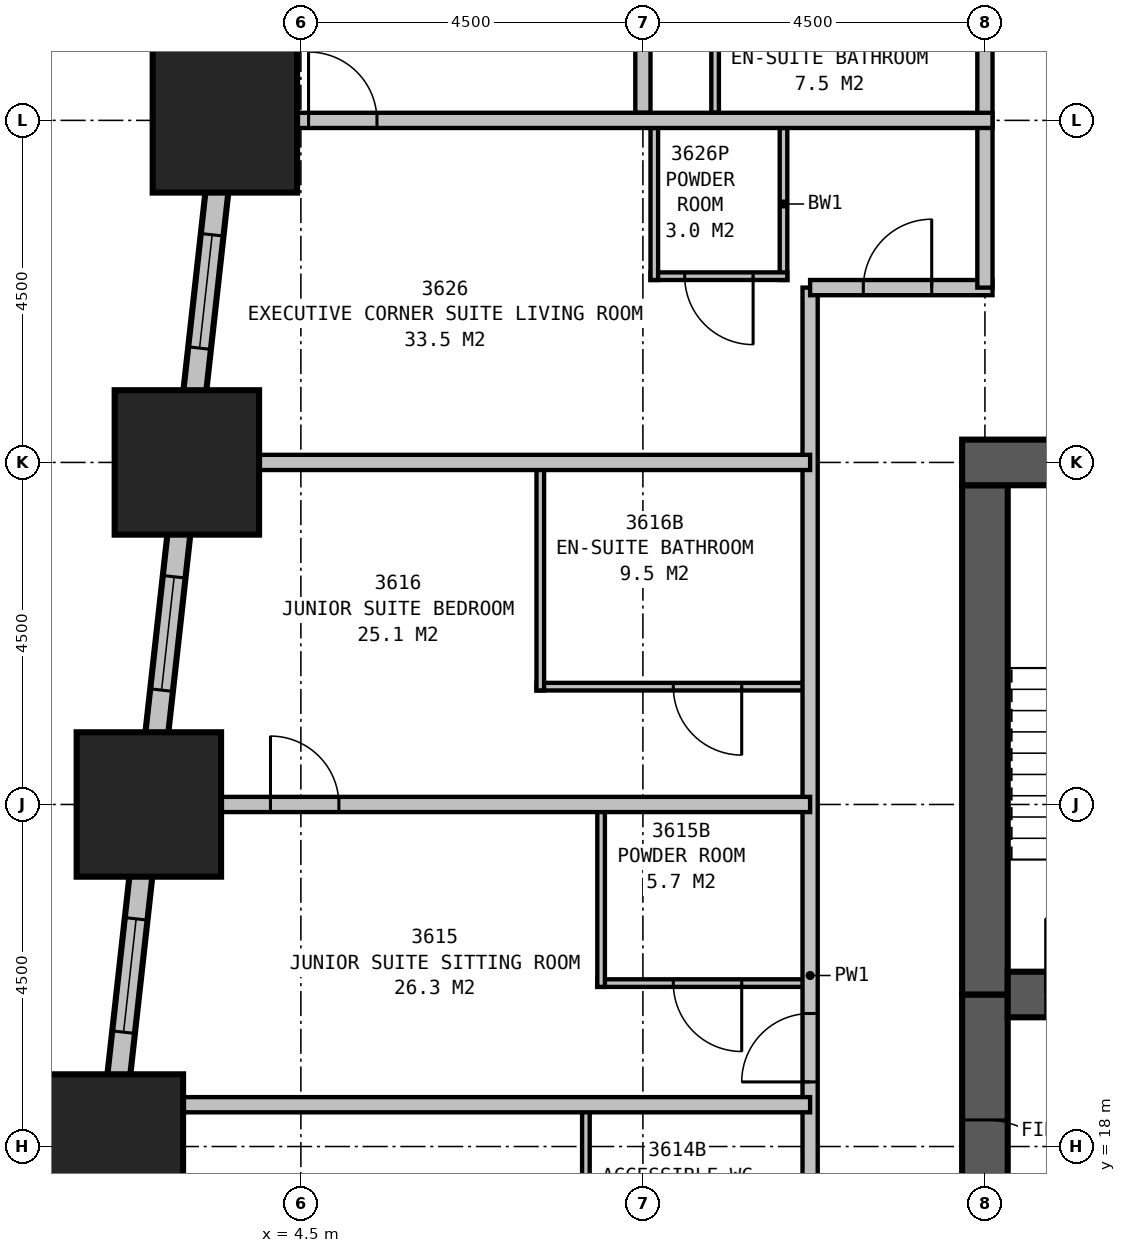
"""IFC4 building model, lengths in metres.
Left out: names, types, materials, properties, quantities, classifications, styles, units other than length and angle.
Written with IfcOpenShell. Run it as: python <this file> out.ifc"""

import sys

from ifc_helpers import new_model, si_unit, direction, frame, frame_2d, origin, origin_2d, place, context, subcontext, project, spatial, rectangle, extrude, element, fill, save


model = new_model("IFC4")
c1 = context("Model", 3, precision=1e-05, world=origin(), true_north=direction((0.0, 1.0)))
c2 = subcontext(c1, "Body", "Model", "MODEL_VIEW")
j1 = project(units=[si_unit("LENGTHUNIT", "METRE"), si_unit("PLANEANGLEUNIT", "RADIAN")], contexts=[c1])
p1 = place(None, origin())
s1 = spatial("IfcSite", under=j1, at=p1, CompositionType="ELEMENT")
p2 = place(p1, origin())
s2 = spatial("IfcBuilding", under=s1, at=p2, CompositionType="ELEMENT")
p3 = place(p2, frame((0.0, 0.0, 138.9)))
s3 = spatial("IfcBuildingStorey", under=s2, at=p3, CompositionType="ELEMENT", Elevation=138.9)
for number, where, z_axis, x_axis in (
    (1, (3.5, 31.5, 0.0), (0.0, 0.0, 1.0), (1.0, 0.0, 0.0)),
    (2, (3.0, 27.0, 0.0), (0.0, 0.0, 1.0), (1.0, 0.0, 0.0)),
    (3, (2.5, 22.5, 0.0), (0.0, 0.0, 1.0), (1.0, 0.0, 0.0)),
    (4, (2.0, 18.0, 0.0), (0.0, 0.0, 1.0), (1.0, 0.0, 0.0)),
):
    element("IfcColumn", number, at=place(p3, frame(where, z_axis=z_axis, x_axis=x_axis)), inside=s3, PredefinedType="COLUMN", context=c2, shape_type="SweptSolid", body=[
        extrude(rectangle(XDim=1.9, YDim=1.9, at=origin_2d()), origin(), (0.0, 0.0, 1.0), 3.5),
    ])
p4 = place(p3, frame((36.3, 27.0, 0.0), z_axis=(0.0, 0.0, 1.0), x_axis=(-1.0, 0.0, 0.0)))
e5 = element("IfcWall", 5, at=p4, inside=s3, PredefinedType="SHEAR", context=c2, shape_type="SweptSolid", body=[
    extrude(rectangle(XDim=23.1, YDim=0.6, at=frame_2d((11.55, 0.0))), origin(), (0.0, 0.0, 1.0), 3.5),
])
p5 = place(p4, frame((17.05, 0.0, 0.0)))
e6 = element("IfcOpeningElement", 6, at=p5, cuts=e5, PredefinedType="OPENING", context=c2, shape_type="SweptSolid", body=[
    extrude(rectangle(XDim=1.0, YDim=2.1, at=frame_2d((0.5, 1.05))), frame((0.0, 0.31, 0.0), z_axis=(0.0, -1.0, 0.0), x_axis=(1.0, 0.0, 0.0)), (0.0, 0.0, 1.0), 0.62),
])
p6 = place(p4, frame((12.05, 0.0, 0.0)))
e7 = element("IfcOpeningElement", 7, at=p6, cuts=e5, PredefinedType="OPENING", context=c2, shape_type="SweptSolid", body=[
    extrude(rectangle(XDim=1.0, YDim=2.1, at=frame_2d((0.5, 1.05))), frame((0.0, 0.31, 0.0), z_axis=(0.0, -1.0, 0.0), x_axis=(1.0, 0.0, 0.0)), (0.0, 0.0, 1.0), 0.62),
])
p7 = place(p4, frame((7.05, 0.0, 0.0)))
e8 = element("IfcOpeningElement", 8, at=p7, cuts=e5, PredefinedType="OPENING", context=c2, shape_type="SweptSolid", body=[
    extrude(rectangle(XDim=1.0, YDim=2.1, at=frame_2d((0.5, 1.05))), frame((0.0, 0.31, 0.0), z_axis=(0.0, -1.0, 0.0), x_axis=(1.0, 0.0, 0.0)), (0.0, 0.0, 1.0), 0.62),
])
p8 = place(p3, frame((13.8, 20.0, 0.0), z_axis=(0.0, 0.0, 1.0), x_axis=(1.0, 0.0, 0.0)))
e9 = element("IfcWall", 9, at=p8, inside=s3, PredefinedType="SHEAR", context=c2, shape_type="SweptSolid", body=[
    extrude(rectangle(XDim=21.9, YDim=0.6, at=frame_2d((10.95, 0.0))), origin(), (0.0, 0.0, 1.0), 3.5),
])
p9 = place(p8, frame((0.5, 0.0, 0.0)))
e10 = element("IfcOpeningElement", 10, at=p9, cuts=e9, PredefinedType="OPENING", context=c2, shape_type="SweptSolid", body=[
    extrude(rectangle(XDim=1.0, YDim=2.1, at=frame_2d((0.5, 1.05))), frame((0.0, 0.31, 0.0), z_axis=(0.0, -1.0, 0.0), x_axis=(1.0, 0.0, 0.0)), (0.0, 0.0, 1.0), 0.62),
])
p10 = place(p8, frame((20.5, 0.0, 0.0)))
e11 = element("IfcOpeningElement", 11, at=p10, cuts=e9, PredefinedType="OPENING", context=c2, shape_type="SweptSolid", body=[
    extrude(rectangle(XDim=1.0, YDim=2.1, at=frame_2d((0.5, 1.05))), frame((0.0, 0.31, 0.0), z_axis=(0.0, -1.0, 0.0), x_axis=(1.0, 0.0, 0.0)), (0.0, 0.0, 1.0), 0.62),
])
p11 = place(p8, frame((16.65, 0.0, 0.0)))
e12 = element("IfcOpeningElement", 12, at=p11, cuts=e9, PredefinedType="OPENING", context=c2, shape_type="SweptSolid", body=[
    extrude(rectangle(XDim=1.1, YDim=2.1, at=frame_2d((0.55, 1.05))), frame((0.0, 0.31, 0.0), z_axis=(0.0, -1.0, 0.0), x_axis=(1.0, 0.0, 0.0)), (0.0, 0.0, 1.0), 0.62),
])
p12 = place(p3, frame((13.5, 26.7, 0.0), z_axis=(0.0, 0.0, 1.0), x_axis=(0.0, -1.0, 0.0)))
e13 = element("IfcWall", 13, at=p12, inside=s3, PredefinedType="SHEAR", context=c2, shape_type="SweptSolid", body=[
    extrude(rectangle(XDim=6.7, YDim=0.6, at=frame_2d((3.35, 0.0))), origin(), (0.0, 0.0, 1.0), 3.5),
])
p13 = place(p3, frame((13.5, 20.0, 0.0), z_axis=(0.0, 0.0, 1.0), x_axis=(0.0, -1.0, 0.0)))
e14 = element("IfcWall", 14, at=p13, inside=s3, PredefinedType="SHEAR", context=c2, shape_type="SweptSolid", body=[
    extrude(rectangle(XDim=3.5, YDim=0.6, at=frame_2d((1.75, 0.0))), origin(), (0.0, 0.0, 1.0), 3.5),
])
p14 = place(p13, frame((1.65, 0.0, 0.0)))
e15 = element("IfcOpeningElement", 15, at=p14, cuts=e14, PredefinedType="OPENING", context=c2, shape_type="SweptSolid", body=[
    extrude(rectangle(XDim=1.2, YDim=2.1, at=frame_2d((0.6, 1.05))), frame((0.0, 0.31, 0.0), z_axis=(0.0, -1.0, 0.0), x_axis=(1.0, 0.0, 0.0)), (0.0, 0.0, 1.0), 0.62),
])
p15 = place(p3, frame((4.017, 36.149, 0.0), z_axis=(0.0, 0.0, 1.0), x_axis=(-0.110433201132, -0.993883548555, 0.0)))
e16 = element("IfcWall", 16, at=p15, inside=s3, PredefinedType="STANDARD", context=c2, shape_type="SweptSolid", body=[
    extrude(rectangle(XDim=31.994, YDim=0.3, at=frame_2d((15.997, 0.0))), origin(), (0.0, 0.0, 1.0), 2.15),
])
p16 = place(p15, frame((1.664, 0.0, 0.5)))
e17 = element("IfcOpeningElement", 17, at=p16, cuts=e16, PredefinedType="OPENING", context=c2, shape_type="SweptSolid", body=[
    extrude(rectangle(XDim=1.5, YDim=1.5, at=frame_2d((0.75, 0.75))), frame((0.0, 0.16, 0.0), z_axis=(0.0, -1.0, 0.0), x_axis=(1.0, 0.0, 0.0)), (0.0, 0.0, 1.0), 0.32),
])
p17 = place(p15, frame((6.192, 0.0, 0.5)))
e18 = element("IfcOpeningElement", 18, at=p17, cuts=e16, PredefinedType="OPENING", context=c2, shape_type="SweptSolid", body=[
    extrude(rectangle(XDim=1.5, YDim=1.5, at=frame_2d((0.75, 0.75))), frame((0.0, 0.16, 0.0), z_axis=(0.0, -1.0, 0.0), x_axis=(1.0, 0.0, 0.0)), (0.0, 0.0, 1.0), 0.32),
])
p18 = place(p15, frame((10.719, 0.0, 0.5)))
e19 = element("IfcOpeningElement", 19, at=p18, cuts=e16, PredefinedType="OPENING", context=c2, shape_type="SweptSolid", body=[
    extrude(rectangle(XDim=1.5, YDim=1.5, at=frame_2d((0.75, 0.75))), frame((0.0, 0.16, 0.0), z_axis=(0.0, -1.0, 0.0), x_axis=(1.0, 0.0, 0.0)), (0.0, 0.0, 1.0), 0.32),
])
p19 = place(p15, frame((15.247, 0.0, 0.5)))
e20 = element("IfcOpeningElement", 20, at=p19, cuts=e16, PredefinedType="OPENING", context=c2, shape_type="SweptSolid", body=[
    extrude(rectangle(XDim=1.5, YDim=1.5, at=frame_2d((0.75, 0.75))), frame((0.0, 0.16, 0.0), z_axis=(0.0, -1.0, 0.0), x_axis=(1.0, 0.0, 0.0)), (0.0, 0.0, 1.0), 0.32),
])
p20 = place(p15, frame((19.775, 0.0, 0.5)))
e21 = element("IfcOpeningElement", 21, at=p20, cuts=e16, PredefinedType="OPENING", context=c2, shape_type="SweptSolid", body=[
    extrude(rectangle(XDim=1.5, YDim=1.5, at=frame_2d((0.75, 0.75))), frame((0.0, 0.16, 0.0), z_axis=(0.0, -1.0, 0.0), x_axis=(1.0, 0.0, 0.0)), (0.0, 0.0, 1.0), 0.32),
])
p21 = place(p15, frame((24.302, 0.0, 0.5)))
e22 = element("IfcOpeningElement", 22, at=p21, cuts=e16, PredefinedType="OPENING", context=c2, shape_type="SweptSolid", body=[
    extrude(rectangle(XDim=1.5, YDim=1.5, at=frame_2d((0.75, 0.75))), frame((0.0, 0.16, 0.0), z_axis=(0.0, -1.0, 0.0), x_axis=(1.0, 0.0, 0.0)), (0.0, 0.0, 1.0), 0.32),
])
p22 = place(p15, frame((28.83, 0.0, 0.5)))
e23 = element("IfcOpeningElement", 23, at=p22, cuts=e16, PredefinedType="OPENING", context=c2, shape_type="SweptSolid", body=[
    extrude(rectangle(XDim=1.5, YDim=1.5, at=frame_2d((0.75, 0.75))), frame((0.0, 0.16, 0.0), z_axis=(0.0, -1.0, 0.0), x_axis=(1.0, 0.0, 0.0)), (0.0, 0.0, 1.0), 0.32),
])
p23 = place(p3, frame((11.2, 29.3, 0.0), z_axis=(0.0, 0.0, 1.0), x_axis=(1.0, 0.0, 0.0)))
e24 = element("IfcWall", 24, at=p23, inside=s3, PredefinedType="PARTITIONING", context=c2, shape_type="SweptSolid", body=[
    extrude(rectangle(XDim=2.4, YDim=0.2, at=frame_2d((1.2, 0.0))), origin(), (0.0, 0.0, 1.0), 3.25),
])
p24 = place(p23, frame((0.7, 0.0, 0.0)))
e25 = element("IfcOpeningElement", 25, at=p24, cuts=e24, PredefinedType="OPENING", context=c2, shape_type="SweptSolid", body=[
    extrude(rectangle(XDim=0.9, YDim=2.1, at=frame_2d((0.45, 1.05))), frame((0.0, 0.11, 0.0), z_axis=(0.0, -1.0, 0.0), x_axis=(1.0, 0.0, 0.0)), (0.0, 0.0, 1.0), 0.22),
])
p25 = place(p3, frame((11.2, 11.2, 0.0), z_axis=(0.0, 0.0, 1.0), x_axis=(0.0, 1.0, 0.0)))
e26 = element("IfcWall", 26, at=p25, inside=s3, PredefinedType="PARTITIONING", context=c2, shape_type="SweptSolid", body=[
    extrude(rectangle(XDim=18.1, YDim=0.2, at=frame_2d((9.05, 0.0))), origin(), (0.0, 0.0, 1.0), 3.25),
])
p26 = place(p25, frame((3.2, 0.0, 0.0)))
e27 = element("IfcOpeningElement", 27, at=p26, cuts=e26, PredefinedType="OPENING", context=c2, shape_type="SweptSolid", body=[
    extrude(rectangle(XDim=1.0, YDim=2.1, at=frame_2d((0.5, 1.05))), frame((0.0, 0.11, 0.0), z_axis=(0.0, -1.0, 0.0), x_axis=(1.0, 0.0, 0.0)), (0.0, 0.0, 1.0), 0.22),
])
p27 = place(p25, frame((7.65, 0.0, 0.0)))
e28 = element("IfcOpeningElement", 28, at=p27, cuts=e26, PredefinedType="OPENING", context=c2, shape_type="SweptSolid", body=[
    extrude(rectangle(XDim=0.9, YDim=2.1, at=frame_2d((0.45, 1.05))), frame((0.0, 0.11, 0.0), z_axis=(0.0, -1.0, 0.0), x_axis=(1.0, 0.0, 0.0)), (0.0, 0.0, 1.0), 0.22),
])
p28 = place(p3, frame((11.2, 18.55, 0.0), z_axis=(0.0, 0.0, 1.0), x_axis=(-1.0, 0.0, 0.0)))
e29 = element("IfcWall", 29, at=p28, inside=s3, PredefinedType="PARTITIONING", context=c2, shape_type="SweptSolid", body=[
    extrude(rectangle(XDim=9.138, YDim=0.2, at=frame_2d((4.569, 0.0))), origin(), (0.0, 0.0, 1.0), 3.25),
])
p29 = place(p3, frame((11.2, 22.5, 0.0), z_axis=(0.0, 0.0, 1.0), x_axis=(-1.0, 0.0, 0.0)))
e30 = element("IfcWall", 30, at=p29, inside=s3, PredefinedType="PARTITIONING", context=c2, shape_type="SweptSolid", body=[
    extrude(rectangle(XDim=8.699, YDim=0.2, at=frame_2d((4.35, 0.0))), origin(), (0.0, 0.0, 1.0), 2.25),
])
p30 = place(p29, frame((7.1, 0.0, 0.0), z_axis=(0.0, 0.0, 1.0), x_axis=(-1.0, 0.0, 0.0)))
e31 = element("IfcOpeningElement", 31, at=p30, cuts=e30, PredefinedType="OPENING", context=c2, shape_type="SweptSolid", body=[
    extrude(rectangle(XDim=0.9, YDim=2.1, at=frame_2d((0.45, 1.05))), frame((0.0, 0.11, 0.0), z_axis=(0.0, -1.0, 0.0), x_axis=(1.0, 0.0, 0.0)), (0.0, 0.0, 1.0), 0.22),
])
p31 = place(p3, frame((8.25, 15.75, 0.0), z_axis=(0.0, 0.0, 1.0), x_axis=(0.0, 1.0, 0.0)))
e32 = element("IfcWall", 32, at=p31, inside=s3, PredefinedType="PLUMBINGWALL", context=c2, shape_type="SweptSolid", body=[
    extrude(rectangle(XDim=2.8, YDim=0.1, at=frame_2d((1.4, 0.0))), origin(), (0.0, 0.0, 1.0), 3.25),
])
p32 = place(p3, frame((8.45, 20.1, 0.0), z_axis=(0.0, 0.0, 1.0), x_axis=(0.0, 1.0, 0.0)))
e33 = element("IfcWall", 33, at=p32, inside=s3, PredefinedType="PLUMBINGWALL", context=c2, shape_type="SweptSolid", body=[
    extrude(rectangle(XDim=2.4, YDim=0.1, at=frame_2d((1.2, 0.0))), origin(), (0.0, 0.0, 1.0), 3.25),
])
p33 = place(p3, frame((11.2, 20.15, 0.0), z_axis=(0.0, 0.0, 1.0), x_axis=(-1.0, 0.0, 0.0)))
e34 = element("IfcWall", 34, at=p33, inside=s3, PredefinedType="PLUMBINGWALL", context=c2, shape_type="SweptSolid", body=[
    extrude(rectangle(XDim=2.8, YDim=0.1, at=frame_2d((1.4, 0.0))), origin(), (0.0, 0.0, 1.0), 3.25),
])
p34 = place(p33, frame((0.9, 0.0, 0.0)))
e35 = element("IfcOpeningElement", 35, at=p34, cuts=e34, PredefinedType="OPENING", context=c2, shape_type="SweptSolid", body=[
    extrude(rectangle(XDim=0.9, YDim=2.1, at=frame_2d((0.45, 1.05))), frame((0.0, 0.06, 0.0), z_axis=(0.0, -1.0, 0.0), x_axis=(1.0, 0.0, 0.0)), (0.0, 0.0, 1.0), 0.12),
])
p35 = place(p3, frame((7.65, 24.0, 0.0), z_axis=(0.0, 0.0, 1.0), x_axis=(0.0, 1.0, 0.0)))
e36 = element("IfcWall", 36, at=p35, inside=s3, PredefinedType="PLUMBINGWALL", context=c2, shape_type="SweptSolid", body=[
    extrude(rectangle(XDim=3.0, YDim=0.1, at=frame_2d((1.5, 0.0))), origin(), (0.0, 0.0, 1.0), 3.25),
])
p36 = place(p3, frame((11.2, 24.05, 0.0), z_axis=(0.0, 0.0, 1.0), x_axis=(-1.0, 0.0, 0.0)))
e37 = element("IfcWall", 37, at=p36, inside=s3, PredefinedType="PLUMBINGWALL", context=c2, shape_type="SweptSolid", body=[
    extrude(rectangle(XDim=3.6, YDim=0.1, at=frame_2d((1.8, 0.0))), origin(), (0.0, 0.0, 1.0), 3.25),
])
p37 = place(p36, frame((0.9, 0.0, 0.0)))
e38 = element("IfcOpeningElement", 38, at=p37, cuts=e37, PredefinedType="OPENING", context=c2, shape_type="SweptSolid", body=[
    extrude(rectangle(XDim=0.9, YDim=2.1, at=frame_2d((0.45, 1.05))), frame((0.0, 0.06, 0.0), z_axis=(0.0, -1.0, 0.0), x_axis=(1.0, 0.0, 0.0)), (0.0, 0.0, 1.0), 0.12),
])
p38 = place(p3, frame((11.2, 27.0, 0.0), z_axis=(0.0, 0.0, 1.0), x_axis=(-1.0, 0.0, 0.0)))
e39 = element("IfcWall", 39, at=p38, inside=s3, PredefinedType="PARTITIONING", context=c2, shape_type="SweptSolid", body=[
    extrude(rectangle(XDim=7.977, YDim=0.2, at=frame_2d((3.988, 0.0))), origin(), (0.0, 0.0, 1.0), 1.95),
])
p39 = place(p3, frame((13.5, 29.3, 0.0), z_axis=(0.0, 0.0, 1.0), x_axis=(0.0, 1.0, 0.0)))
e40 = element("IfcWall", 40, at=p39, inside=s3, PredefinedType="PARTITIONING", context=c2, shape_type="SweptSolid", body=[
    extrude(rectangle(XDim=11.2, YDim=0.2, at=frame_2d((5.6, 0.0))), origin(), (0.0, 0.0, 1.0), 2.25),
])
p40 = place(p3, frame((13.6, 31.5, 0.0), z_axis=(0.0, 0.0, 1.0), x_axis=(-1.0, 0.0, 0.0)))
e41 = element("IfcWall", 41, at=p40, inside=s3, PredefinedType="PARTITIONING", context=c2, shape_type="SweptSolid", body=[
    extrude(rectangle(XDim=10.099, YDim=0.2, at=frame_2d((5.05, 0.0))), origin(), (0.0, 0.0, 1.0), 3.25),
])
p41 = place(p40, frame((8.999, 0.0, 0.0), z_axis=(0.0, 0.0, 1.0), x_axis=(-1.0, 0.0, 0.0)))
e42 = element("IfcOpeningElement", 42, at=p41, cuts=e41, PredefinedType="OPENING", context=c2, shape_type="SweptSolid", body=[
    extrude(rectangle(XDim=0.9, YDim=2.1, at=frame_2d((0.45, 1.05))), frame((0.0, 0.11, 0.0), z_axis=(0.0, -1.0, 0.0), x_axis=(1.0, 0.0, 0.0)), (0.0, 0.0, 1.0), 0.22),
])
p42 = place(p3, frame((9.15, 31.4, 0.0), z_axis=(0.0, 0.0, 1.0), x_axis=(0.0, -1.0, 0.0)))
e43 = element("IfcWall", 43, at=p42, inside=s3, PredefinedType="PLUMBINGWALL", context=c2, shape_type="SweptSolid", body=[
    extrude(rectangle(XDim=2.0, YDim=0.1, at=frame_2d((1.0, 0.0))), origin(), (0.0, 0.0, 1.0), 2.25),
])
p43 = place(p3, frame((10.85, 31.4, 0.0), z_axis=(0.0, 0.0, 1.0), x_axis=(0.0, -1.0, 0.0)))
e44 = element("IfcWall", 44, at=p43, inside=s3, PredefinedType="PLUMBINGWALL", context=c2, shape_type="SweptSolid", body=[
    extrude(rectangle(XDim=2.0, YDim=0.1, at=frame_2d((1.0, 0.0))), origin(), (0.0, 0.0, 1.0), 3.25),
])
p44 = place(p3, frame((10.9, 29.45, 0.0), z_axis=(0.0, 0.0, 1.0), x_axis=(-1.0, 0.0, 0.0)))
e45 = element("IfcWall", 45, at=p44, inside=s3, PredefinedType="PLUMBINGWALL", context=c2, shape_type="SweptSolid", body=[
    extrude(rectangle(XDim=1.8, YDim=0.1, at=frame_2d((0.9, 0.0))), origin(), (0.0, 0.0, 1.0), 3.25),
])
p45 = place(p44, frame((0.45, 0.0, 0.0)))
e46 = element("IfcOpeningElement", 46, at=p45, cuts=e45, PredefinedType="OPENING", context=c2, shape_type="SweptSolid", body=[
    extrude(rectangle(XDim=0.9, YDim=2.1, at=frame_2d((0.45, 1.05))), frame((0.0, 0.06, 0.0), z_axis=(0.0, -1.0, 0.0), x_axis=(1.0, 0.0, 0.0)), (0.0, 0.0, 1.0), 0.12),
])
p46 = place(p3, frame((9.0, 31.6, 0.0), z_axis=(0.0, 0.0, 1.0), x_axis=(0.0, 1.0, 0.0)))
e47 = element("IfcWall", 47, at=p46, inside=s3, PredefinedType="PARTITIONING", context=c2, shape_type="SweptSolid", body=[
    extrude(rectangle(XDim=4.4, YDim=0.2, at=frame_2d((2.2, 0.0))), origin(), (0.0, 0.0, 1.0), 2.25),
])
p47 = place(p46, frame((3.3, 0.0, 0.0), z_axis=(0.0, 0.0, 1.0), x_axis=(-1.0, 0.0, 0.0)))
e48 = element("IfcOpeningElement", 48, at=p47, cuts=e47, PredefinedType="OPENING", context=c2, shape_type="SweptSolid", body=[
    extrude(rectangle(XDim=0.9, YDim=2.1, at=frame_2d((0.45, 1.05))), frame((0.0, 0.11, 0.0), z_axis=(0.0, -1.0, 0.0), x_axis=(1.0, 0.0, 0.0)), (0.0, 0.0, 1.0), 0.22),
])
p48 = place(p3, frame((9.95, 31.6, 0.0), z_axis=(0.0, 0.0, 1.0), x_axis=(0.0, 1.0, 0.0)))
e49 = element("IfcWall", 49, at=p48, inside=s3, PredefinedType="PLUMBINGWALL", context=c2, shape_type="SweptSolid", body=[
    extrude(rectangle(XDim=2.3, YDim=0.1, at=frame_2d((1.15, 0.0))), origin(), (0.0, 0.0, 1.0), 3.25),
])
p49 = place(p17, origin())
e50 = element("IfcWindow", 50, at=p49, inside=s3, PartitioningType="SINGLE_PANEL", PredefinedType="WINDOW", context=c2, shape_type="SweptSolid", body=[
    extrude(rectangle(XDim=1.5, YDim=1.5, at=frame_2d((0.75, 0.75))), frame((0.0, 0.03, 0.0), z_axis=(0.0, -1.0, 0.0), x_axis=(1.0, 0.0, 0.0)), (0.0, 0.0, 1.0), 0.06),
])
fill(e18, e50)
p50 = place(p18, origin())
e51 = element("IfcWindow", 51, at=p50, inside=s3, PartitioningType="SINGLE_PANEL", PredefinedType="WINDOW", context=c2, shape_type="SweptSolid", body=[
    extrude(rectangle(XDim=1.5, YDim=1.5, at=frame_2d((0.75, 0.75))), frame((0.0, 0.03, 0.0), z_axis=(0.0, -1.0, 0.0), x_axis=(1.0, 0.0, 0.0)), (0.0, 0.0, 1.0), 0.06),
])
fill(e19, e51)
p51 = place(p19, origin())
e52 = element("IfcWindow", 52, at=p51, inside=s3, PartitioningType="SINGLE_PANEL", PredefinedType="WINDOW", context=c2, shape_type="SweptSolid", body=[
    extrude(rectangle(XDim=1.5, YDim=1.5, at=frame_2d((0.75, 0.75))), frame((0.0, 0.03, 0.0), z_axis=(0.0, -1.0, 0.0), x_axis=(1.0, 0.0, 0.0)), (0.0, 0.0, 1.0), 0.06),
])
fill(e20, e52)
p52 = place(p24, origin())
e53 = element("IfcDoor", 53, at=p52, inside=s3, OperationType="SINGLE_SWING_RIGHT", PredefinedType="DOOR", context=c2, shape_type="SweptSolid", body=[
    extrude(rectangle(XDim=0.9, YDim=2.1, at=frame_2d((0.45, 1.05))), frame((0.0, 0.025, 0.0), z_axis=(0.0, -1.0, 0.0), x_axis=(1.0, 0.0, 0.0)), (0.0, 0.0, 1.0), 0.05),
])
fill(e25, e53)
p53 = place(p27, origin())
e54 = element("IfcDoor", 54, at=p53, inside=s3, OperationType="SINGLE_SWING_LEFT", PredefinedType="DOOR", context=c2, shape_type="SweptSolid", body=[
    extrude(rectangle(XDim=0.9, YDim=2.1, at=frame_2d((0.45, 1.05))), frame((0.0, 0.025, 0.0), z_axis=(0.0, -1.0, 0.0), x_axis=(1.0, 0.0, 0.0)), (0.0, 0.0, 1.0), 0.05),
])
fill(e28, e54)
p54 = place(p30, origin())
e55 = element("IfcDoor", 55, at=p54, inside=s3, OperationType="SINGLE_SWING_LEFT", PredefinedType="DOOR", context=c2, shape_type="SweptSolid", body=[
    extrude(rectangle(XDim=0.9, YDim=2.1, at=frame_2d((0.45, 1.05))), frame((0.0, 0.025, 0.0), z_axis=(0.0, -1.0, 0.0), x_axis=(1.0, 0.0, 0.0)), (0.0, 0.0, 1.0), 0.05),
])
fill(e31, e55)
p55 = place(p34, origin())
e56 = element("IfcDoor", 56, at=p55, inside=s3, OperationType="SINGLE_SWING_LEFT", PredefinedType="DOOR", context=c2, shape_type="SweptSolid", body=[
    extrude(rectangle(XDim=0.9, YDim=2.1, at=frame_2d((0.45, 1.05))), frame((0.0, 0.025, 0.0), z_axis=(0.0, -1.0, 0.0), x_axis=(1.0, 0.0, 0.0)), (0.0, 0.0, 1.0), 0.05),
])
fill(e35, e56)
p56 = place(p37, origin())
e57 = element("IfcDoor", 57, at=p56, inside=s3, OperationType="SINGLE_SWING_LEFT", PredefinedType="DOOR", context=c2, shape_type="SweptSolid", body=[
    extrude(rectangle(XDim=0.9, YDim=2.1, at=frame_2d((0.45, 1.05))), frame((0.0, 0.025, 0.0), z_axis=(0.0, -1.0, 0.0), x_axis=(1.0, 0.0, 0.0)), (0.0, 0.0, 1.0), 0.05),
])
fill(e38, e57)
p57 = place(p41, origin())
e58 = element("IfcDoor", 58, at=p57, inside=s3, OperationType="SINGLE_SWING_LEFT", PredefinedType="DOOR", context=c2, shape_type="SweptSolid", body=[
    extrude(rectangle(XDim=0.9, YDim=2.1, at=frame_2d((0.45, 1.05))), frame((0.0, 0.025, 0.0), z_axis=(0.0, -1.0, 0.0), x_axis=(1.0, 0.0, 0.0)), (0.0, 0.0, 1.0), 0.05),
])
fill(e42, e58)
p58 = place(p45, origin())
e59 = element("IfcDoor", 59, at=p58, inside=s3, OperationType="SINGLE_SWING_LEFT", PredefinedType="DOOR", context=c2, shape_type="SweptSolid", body=[
    extrude(rectangle(XDim=0.9, YDim=2.1, at=frame_2d((0.45, 1.05))), frame((0.0, 0.025, 0.0), z_axis=(0.0, -1.0, 0.0), x_axis=(1.0, 0.0, 0.0)), (0.0, 0.0, 1.0), 0.05),
])
fill(e46, e59)
p59 = place(p14, origin())
e60 = element("IfcDoor", 60, at=p59, inside=s3, OperationType="SINGLE_SWING_RIGHT", PredefinedType="DOOR", context=c2, shape_type="SweptSolid", body=[
    extrude(rectangle(XDim=1.2, YDim=2.1, at=frame_2d((0.6, 1.05))), frame((0.0, 0.3, 0.0), z_axis=(0.0, -1.0, 0.0), x_axis=(1.0, 0.0, 0.0)), (0.0, 0.0, 1.0), 0.6),
])
fill(e15, e60)
save(model, sys.argv[1])
